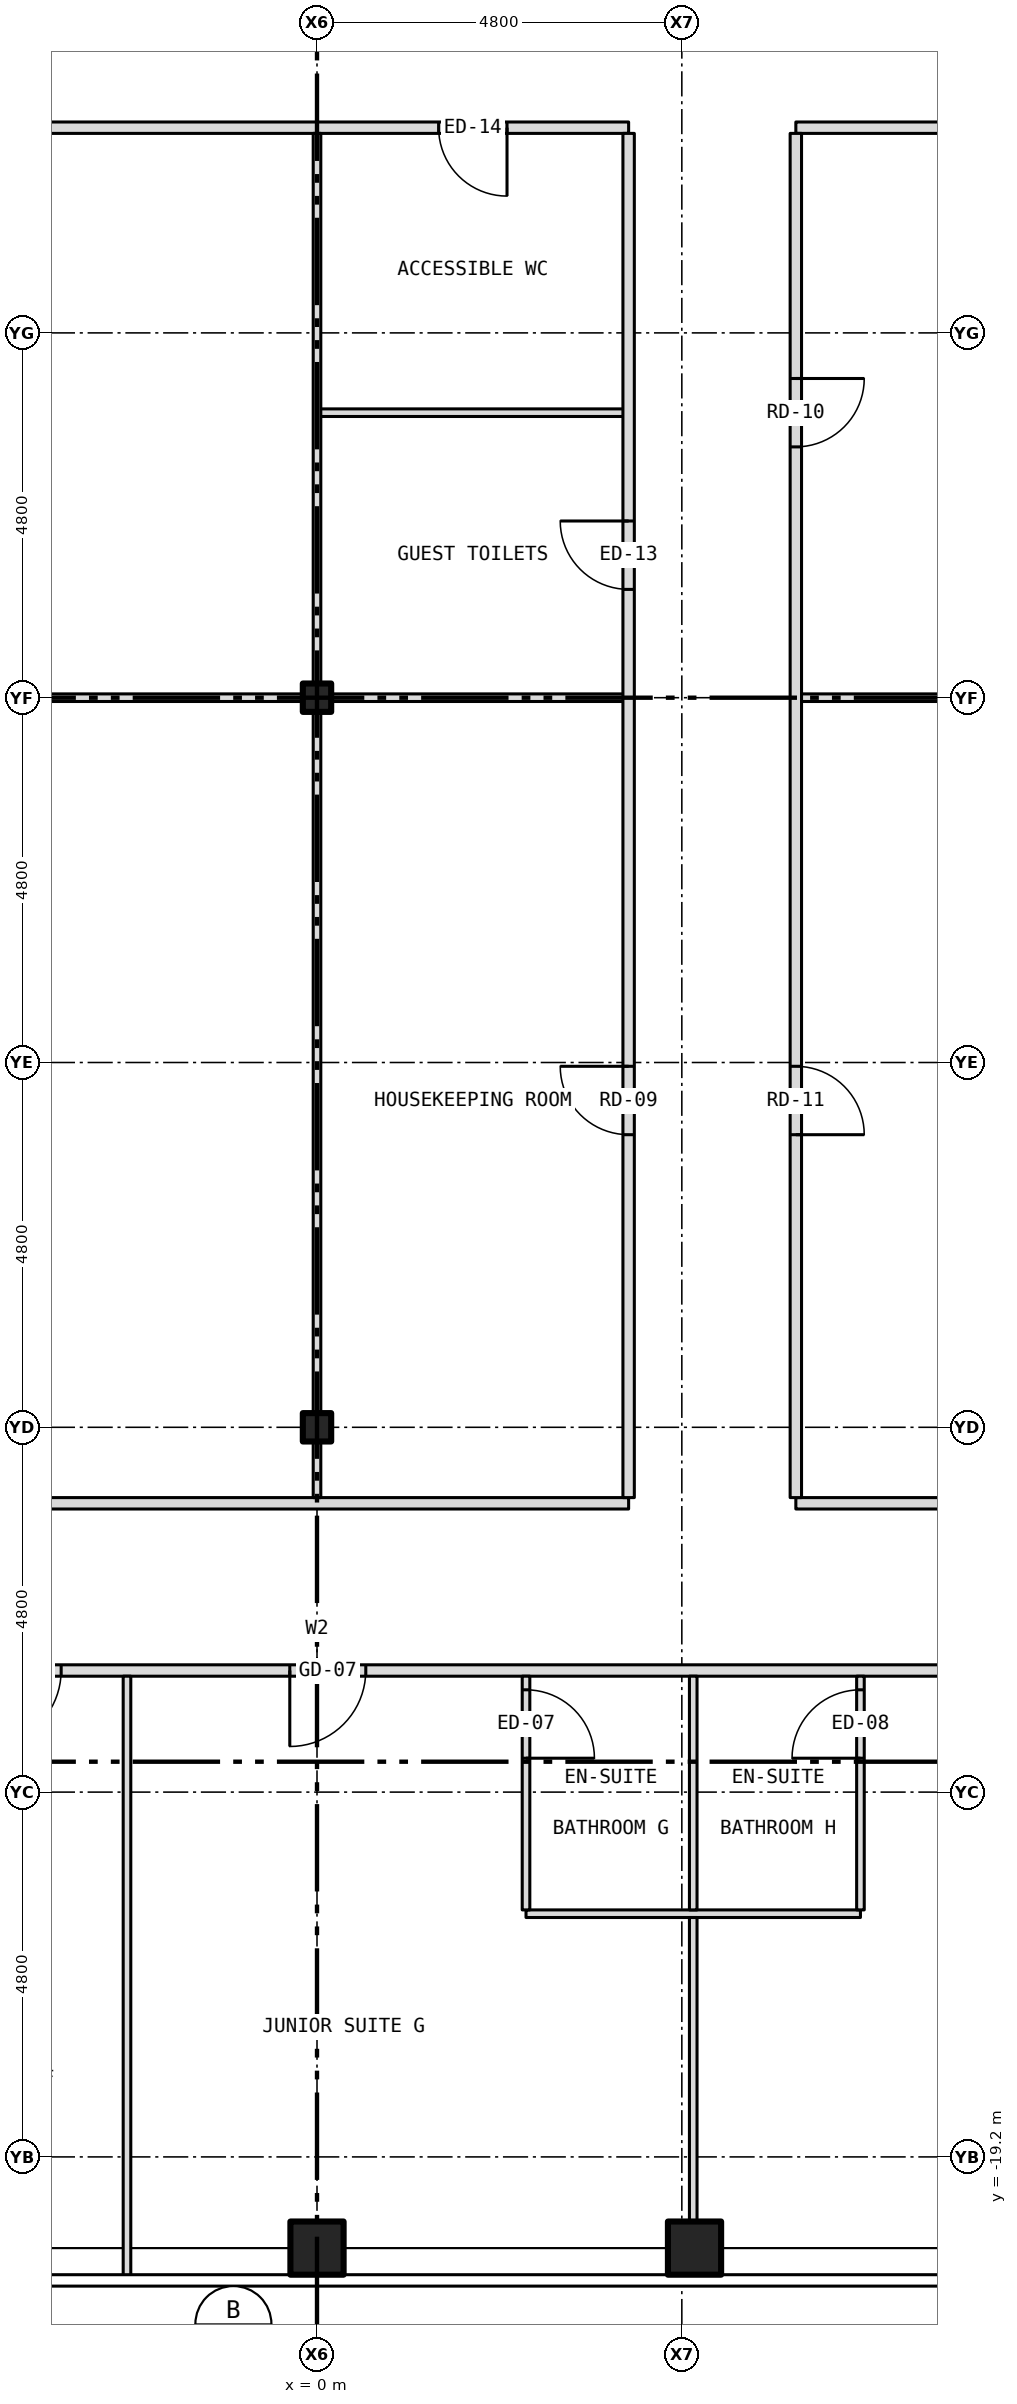
"""IFC4 building model, lengths in metres.
Left out: names, types, materials, properties, quantities, classifications, styles, units other than length and angle.
Written with IfcOpenShell. Run it as: python <this file> out.ifc"""

import sys

from ifc_helpers import new_model, si_unit, direction, frame, frame_2d, origin, origin_2d, place, context, subcontext, project, spatial, rectangle, hollow_rectangle, i_section, extrude, element, fill, save


model = new_model("IFC4")
c1 = context("Model", 3, precision=1e-05, world=origin(), true_north=direction((0.0, 1.0)))
c2 = subcontext(c1, "Body", "Model", "MODEL_VIEW")
j1 = project(units=[si_unit("LENGTHUNIT", "METRE"), si_unit("PLANEANGLEUNIT", "RADIAN")], contexts=[c1])
p1 = place(None, origin())
s1 = spatial("IfcSite", under=j1, at=p1, CompositionType="ELEMENT")
p2 = place(p1, origin())
s2 = spatial("IfcBuilding", under=s1, at=p2, CompositionType="ELEMENT")
p3 = place(p2, frame((0.0, 0.0, 198.0)))
s3 = spatial("IfcBuildingStorey", under=s2, at=p3, CompositionType="ELEMENT", Elevation=198.0)
for number, where, z_axis, x_axis in (
    (1, (0.0, -20.4, -0.15), (0.0, 0.0, 1.0), (1.0, 0.0, 0.0)),
    (2, (4.967, -20.4, -0.15), (0.0, 0.0, 1.0), (1.0, 0.0, 0.0)),
):
    element("IfcColumn", number, at=place(p3, frame(where, z_axis=z_axis, x_axis=x_axis)), inside=s3, PredefinedType="COLUMN", context=c2, shape_type="SweptSolid", body=[
        extrude(hollow_rectangle(XDim=0.7, YDim=0.7, WallThickness=0.04, at=origin_2d()), origin(), (0.0, 0.0, 1.0), 3.5),
    ])
for number, where, z_axis, x_axis in (
    (3, (0.0, -9.6, -0.15), (0.0, 0.0, 1.0), (1.0, 0.0, 0.0)),
    (4, (0.0, 0.0, -0.15), (0.0, 0.0, 1.0), (1.0, 0.0, 0.0)),
):
    element("IfcColumn", number, at=place(p3, frame(where, z_axis=z_axis, x_axis=x_axis)), inside=s3, PredefinedType="COLUMN", context=c2, shape_type="SweptSolid", body=[
        extrude(i_section(OverallWidth=0.373, OverallDepth=0.373, WebThickness=0.016, FlangeThickness=0.026, at=origin_2d()), origin(), (0.0, 0.0, 1.0), 3.5),
    ])
p4 = place(p3, frame((2.75, -16.0, 0.0), z_axis=(0.0, 0.0, 1.0), x_axis=(1.0, 0.0, 0.0)))
e5 = element("IfcWall", 5, at=p4, inside=s3, PredefinedType="PARTITIONING", context=c2, shape_type="SweptSolid", body=[
    extrude(rectangle(XDim=4.4, YDim=0.1, at=frame_2d((2.2, 0.0))), origin(), (0.0, 0.0, 1.0), 3.35),
])
p5 = place(p3, frame((-15.8, -12.8, 0.0), z_axis=(0.0, 0.0, 1.0), x_axis=(1.0, 0.0, 0.0)))
e6 = element("IfcWall", 6, at=p5, inside=s3, PredefinedType="PARTITIONING", context=c2, shape_type="SweptSolid", body=[
    extrude(rectangle(XDim=31.6, YDim=0.15, at=frame_2d((15.8, 0.0))), origin(), (0.0, 0.0, 1.0), 3.35),
])
p6 = place(p5, frame((6.466, 0.0, 0.0)))
e7 = element("IfcOpeningElement", 7, at=p6, cuts=e6, PredefinedType="OPENING", context=c2, shape_type="SweptSolid", body=[
    extrude(rectangle(XDim=1.0, YDim=2.1, at=frame_2d((0.5, 1.05))), frame((0.0, 0.087, 0.0), z_axis=(0.0, -1.0, 0.0), x_axis=(1.0, 0.0, 0.0)), (0.0, 0.0, 1.0), 0.174),
])
p7 = place(p5, frame((11.434, 0.0, 0.0)))
e8 = element("IfcOpeningElement", 8, at=p7, cuts=e6, PredefinedType="OPENING", context=c2, shape_type="SweptSolid", body=[
    extrude(rectangle(XDim=1.0, YDim=2.1, at=frame_2d((0.5, 1.05))), frame((0.0, 0.087, 0.0), z_axis=(0.0, -1.0, 0.0), x_axis=(1.0, 0.0, 0.0)), (0.0, 0.0, 1.0), 0.174),
])
p8 = place(p5, frame((15.442, 0.0, 0.0)))
e9 = element("IfcOpeningElement", 9, at=p8, cuts=e6, PredefinedType="OPENING", context=c2, shape_type="SweptSolid", body=[
    extrude(rectangle(XDim=1.0, YDim=2.1, at=frame_2d((0.5, 1.05))), frame((0.0, 0.087, 0.0), z_axis=(0.0, -1.0, 0.0), x_axis=(1.0, 0.0, 0.0)), (0.0, 0.0, 1.0), 0.174),
])
p9 = place(p5, frame((25.092, 0.0, 0.0)))
e10 = element("IfcOpeningElement", 10, at=p9, cuts=e6, PredefinedType="OPENING", context=c2, shape_type="SweptSolid", body=[
    extrude(rectangle(XDim=1.0, YDim=2.1, at=frame_2d((0.5, 1.05))), frame((0.0, 0.087, 0.0), z_axis=(0.0, -1.0, 0.0), x_axis=(1.0, 0.0, 0.0)), (0.0, 0.0, 1.0), 0.174),
])
p10 = place(p5, frame((1.192, 0.0, 0.0)))
e11 = element("IfcOpeningElement", 11, at=p10, cuts=e6, PredefinedType="OPENING", context=c2, shape_type="SweptSolid", body=[
    extrude(rectangle(XDim=1.0, YDim=2.1, at=frame_2d((0.5, 1.05))), frame((0.0, 0.087, 0.0), z_axis=(0.0, -1.0, 0.0), x_axis=(1.0, 0.0, 0.0)), (0.0, 0.0, 1.0), 0.174),
])
p11 = place(p5, frame((29.409, 0.0, 0.0)))
e12 = element("IfcOpeningElement", 12, at=p11, cuts=e6, PredefinedType="OPENING", context=c2, shape_type="SweptSolid", body=[
    extrude(rectangle(XDim=1.0, YDim=2.1, at=frame_2d((0.5, 1.05))), frame((0.0, 0.087, 0.0), z_axis=(0.0, -1.0, 0.0), x_axis=(1.0, 0.0, 0.0)), (0.0, 0.0, 1.0), 0.174),
])
p12 = place(p3, frame((-12.8, -10.6, 0.0), z_axis=(0.0, 0.0, 1.0), x_axis=(1.0, 0.0, 0.0)))
e13 = element("IfcWall", 13, at=p12, inside=s3, PredefinedType="PARTITIONING", context=c2, shape_type="SweptSolid", body=[
    extrude(rectangle(XDim=16.9, YDim=0.15, at=frame_2d((8.45, 0.0))), origin(), (0.0, 0.0, 1.0), 3.35),
])
p13 = place(p12, frame((5.95, 0.0, 0.0)))
e14 = element("IfcOpeningElement", 14, at=p13, cuts=e13, PredefinedType="OPENING", context=c2, shape_type="SweptSolid", body=[
    extrude(rectangle(XDim=0.9, YDim=2.1, at=frame_2d((0.45, 1.05))), frame((0.0, 0.087, 0.0), z_axis=(0.0, -1.0, 0.0), x_axis=(1.0, 0.0, 0.0)), (0.0, 0.0, 1.0), 0.174),
])
p14 = place(p3, frame((6.3, -10.6, 0.0), z_axis=(0.0, 0.0, 1.0), x_axis=(1.0, 0.0, 0.0)))
e15 = element("IfcWall", 15, at=p14, inside=s3, PredefinedType="PARTITIONING", context=c2, shape_type="SweptSolid", body=[
    extrude(rectangle(XDim=6.5, YDim=0.15, at=frame_2d((3.25, 0.0))), origin(), (0.0, 0.0, 1.0), 3.35),
])
p15 = place(p3, frame((-9.413, 0.0, 0.0), z_axis=(0.0, 0.0, 1.0), x_axis=(1.0, 0.0, 0.0)))
e16 = element("IfcWall", 16, at=p15, inside=s3, PredefinedType="PARTITIONING", context=c2, shape_type="SweptSolid", body=[
    extrude(rectangle(XDim=9.226, YDim=0.1, at=frame_2d((4.613, 0.0))), origin(), (0.0, 0.0, 1.0), 2.728),
])
p16 = place(p3, frame((-0.187, 0.0, 0.0), z_axis=(0.0, 0.0, 1.0), x_axis=(1.0, 0.0, 0.0)))
e17 = element("IfcWall", 17, at=p16, inside=s3, PredefinedType="PARTITIONING", context=c2, shape_type="SweptSolid", body=[
    extrude(rectangle(XDim=0.374, YDim=0.1, at=frame_2d((0.187, 0.0))), origin(), (0.0, 0.0, 1.0), 3.35),
])
p17 = place(p3, frame((0.187, 0.0, 0.0), z_axis=(0.0, 0.0, 1.0), x_axis=(1.0, 0.0, 0.0)))
e18 = element("IfcWall", 18, at=p17, inside=s3, PredefinedType="PARTITIONING", context=c2, shape_type="SweptSolid", body=[
    extrude(rectangle(XDim=3.913, YDim=0.1, at=frame_2d((1.957, 0.0))), origin(), (0.0, 0.0, 1.0), 2.728),
])
p18 = place(p3, frame((6.3, 0.0, 0.0), z_axis=(0.0, 0.0, 1.0), x_axis=(1.0, 0.0, 0.0)))
e19 = element("IfcWall", 19, at=p18, inside=s3, PredefinedType="PARTITIONING", context=c2, shape_type="SweptSolid", body=[
    extrude(rectangle(XDim=3.113, YDim=0.1, at=frame_2d((1.557, 0.0))), origin(), (0.0, 0.0, 1.0), 2.728),
])
p19 = place(p3, frame((0.0, 3.75, 0.0), z_axis=(0.0, 0.0, 1.0), x_axis=(1.0, 0.0, 0.0)))
e20 = element("IfcWall", 20, at=p19, inside=s3, PredefinedType="PARTITIONING", context=c2, shape_type="SweptSolid", body=[
    extrude(rectangle(XDim=4.1, YDim=0.1, at=frame_2d((2.05, 0.0))), origin(), (0.0, 0.0, 1.0), 3.35),
])
p20 = place(p3, frame((-12.8, 7.5, 0.0), z_axis=(0.0, 0.0, 1.0), x_axis=(1.0, 0.0, 0.0)))
e21 = element("IfcWall", 21, at=p20, inside=s3, PredefinedType="PARTITIONING", context=c2, shape_type="SweptSolid", body=[
    extrude(rectangle(XDim=16.9, YDim=0.15, at=frame_2d((8.45, 0.0))), origin(), (0.0, 0.0, 1.0), 3.35),
])
p21 = place(p20, frame((14.4, 0.0, 0.0)))
e22 = element("IfcOpeningElement", 22, at=p21, cuts=e21, PredefinedType="OPENING", context=c2, shape_type="SweptSolid", body=[
    extrude(rectangle(XDim=0.9, YDim=2.1, at=frame_2d((0.45, 1.05))), frame((0.0, 0.087, 0.0), z_axis=(0.0, -1.0, 0.0), x_axis=(1.0, 0.0, 0.0)), (0.0, 0.0, 1.0), 0.174),
])
p22 = place(p20, frame((5.95, 0.0, 0.0)))
e23 = element("IfcOpeningElement", 23, at=p22, cuts=e21, PredefinedType="OPENING", context=c2, shape_type="SweptSolid", body=[
    extrude(rectangle(XDim=0.9, YDim=2.1, at=frame_2d((0.45, 1.05))), frame((0.0, 0.087, 0.0), z_axis=(0.0, -1.0, 0.0), x_axis=(1.0, 0.0, 0.0)), (0.0, 0.0, 1.0), 0.174),
])
p23 = place(p3, frame((6.3, 7.5, 0.0), z_axis=(0.0, 0.0, 1.0), x_axis=(1.0, 0.0, 0.0)))
e24 = element("IfcWall", 24, at=p23, inside=s3, PredefinedType="PARTITIONING", context=c2, shape_type="SweptSolid", body=[
    extrude(rectangle(XDim=6.5, YDim=0.15, at=frame_2d((3.25, 0.0))), origin(), (0.0, 0.0, 1.0), 3.35),
])
p24 = place(p3, frame((-2.5, -20.78, 0.0), z_axis=(0.0, 0.0, 1.0), x_axis=(0.0, 1.0, 0.0)))
e25 = element("IfcWall", 25, at=p24, inside=s3, PredefinedType="PARTITIONING", context=c2, shape_type="SweptSolid", body=[
    extrude(rectangle(XDim=7.905, YDim=0.1, at=frame_2d((3.953, 0.0))), origin(), (0.0, 0.0, 1.0), 3.35),
])
p25 = place(p3, frame((0.0, -10.525, 0.0), z_axis=(0.0, 0.0, 1.0), x_axis=(0.0, 1.0, 0.0)))
e26 = element("IfcWall", 26, at=p25, inside=s3, PredefinedType="PARTITIONING", context=c2, shape_type="SweptSolid", body=[
    extrude(rectangle(XDim=0.738, YDim=0.1, at=frame_2d((0.369, 0.0))), origin(), (0.0, 0.0, 1.0), 2.728),
])
p26 = place(p3, frame((0.0, -9.787, 0.0), z_axis=(0.0, 0.0, 1.0), x_axis=(0.0, 1.0, 0.0)))
e27 = element("IfcWall", 27, at=p26, inside=s3, PredefinedType="PARTITIONING", context=c2, shape_type="SweptSolid", body=[
    extrude(rectangle(XDim=0.374, YDim=0.1, at=frame_2d((0.187, 0.0))), origin(), (0.0, 0.0, 1.0), 3.35),
])
p27 = place(p3, frame((0.0, -9.413, 0.0), z_axis=(0.0, 0.0, 1.0), x_axis=(0.0, 1.0, 0.0)))
e28 = element("IfcWall", 28, at=p27, inside=s3, PredefinedType="PARTITIONING", context=c2, shape_type="SweptSolid", body=[
    extrude(rectangle(XDim=9.363, YDim=0.1, at=frame_2d((4.682, 0.0))), origin(), (0.0, 0.0, 1.0), 2.728),
])
p28 = place(p3, frame((0.0, 0.05, 0.0), z_axis=(0.0, 0.0, 1.0), x_axis=(0.0, 1.0, 0.0)))
e29 = element("IfcWall", 29, at=p28, inside=s3, PredefinedType="PARTITIONING", context=c2, shape_type="SweptSolid", body=[
    extrude(rectangle(XDim=7.375, YDim=0.1, at=frame_2d((3.688, 0.0))), origin(), (0.0, 0.0, 1.0), 2.728),
])
p29 = place(p3, frame((2.75, -15.95, 0.0), z_axis=(0.0, 0.0, 1.0), x_axis=(0.0, 1.0, 0.0)))
e30 = element("IfcWall", 30, at=p29, inside=s3, PredefinedType="PARTITIONING", context=c2, shape_type="SweptSolid", body=[
    extrude(rectangle(XDim=3.075, YDim=0.1, at=frame_2d((1.538, 0.0))), origin(), (0.0, 0.0, 1.0), 3.35),
])
p30 = place(p29, frame((1.996, 0.0, 0.0)))
e31 = element("IfcOpeningElement", 31, at=p30, cuts=e30, PredefinedType="OPENING", context=c2, shape_type="SweptSolid", body=[
    extrude(rectangle(XDim=0.9, YDim=2.1, at=frame_2d((0.45, 1.05))), frame((0.0, 0.062, 0.0), z_axis=(0.0, -1.0, 0.0), x_axis=(1.0, 0.0, 0.0)), (0.0, 0.0, 1.0), 0.124),
])
p31 = place(p3, frame((4.1, -10.525, 0.0), z_axis=(0.0, 0.0, 1.0), x_axis=(0.0, 1.0, 0.0)))
e32 = element("IfcWall", 32, at=p31, inside=s3, PredefinedType="PARTITIONING", context=c2, shape_type="SweptSolid", body=[
    extrude(rectangle(XDim=17.95, YDim=0.15, at=frame_2d((8.975, 0.0))), origin(), (0.0, 0.0, 1.0), 3.35),
])
p32 = place(p31, frame((11.95, 0.0, 0.0)))
e33 = element("IfcOpeningElement", 33, at=p32, cuts=e32, PredefinedType="OPENING", context=c2, shape_type="SweptSolid", body=[
    extrude(rectangle(XDim=0.9, YDim=2.1, at=frame_2d((0.45, 1.05))), frame((0.0, 0.087, 0.0), z_axis=(0.0, -1.0, 0.0), x_axis=(1.0, 0.0, 0.0)), (0.0, 0.0, 1.0), 0.174),
])
p33 = place(p31, frame((4.775, 0.0, 0.0)))
e34 = element("IfcOpeningElement", 34, at=p33, cuts=e32, PredefinedType="OPENING", context=c2, shape_type="SweptSolid", body=[
    extrude(rectangle(XDim=0.9, YDim=2.1, at=frame_2d((0.45, 1.05))), frame((0.0, 0.087, 0.0), z_axis=(0.0, -1.0, 0.0), x_axis=(1.0, 0.0, 0.0)), (0.0, 0.0, 1.0), 0.174),
])
p34 = place(p3, frame((4.95, -20.28, 0.0), z_axis=(0.0, 0.0, 1.0), x_axis=(0.0, 1.0, 0.0)))
e35 = element("IfcWall", 35, at=p34, inside=s3, PredefinedType="PARTITIONING", context=c2, shape_type="SweptSolid", body=[
    extrude(rectangle(XDim=4.23, YDim=0.1, at=frame_2d((2.115, 0.0))), origin(), (0.0, 0.0, 1.0), 2.817),
])
p35 = place(p3, frame((4.95, -15.95, 0.0), z_axis=(0.0, 0.0, 1.0), x_axis=(0.0, 1.0, 0.0)))
e36 = element("IfcWall", 36, at=p35, inside=s3, PredefinedType="PARTITIONING", context=c2, shape_type="SweptSolid", body=[
    extrude(rectangle(XDim=3.075, YDim=0.1, at=frame_2d((1.538, 0.0))), origin(), (0.0, 0.0, 1.0), 2.817),
])
p36 = place(p3, frame((6.3, -10.525, 0.0), z_axis=(0.0, 0.0, 1.0), x_axis=(0.0, 1.0, 0.0)))
e37 = element("IfcWall", 37, at=p36, inside=s3, PredefinedType="PARTITIONING", context=c2, shape_type="SweptSolid", body=[
    extrude(rectangle(XDim=17.95, YDim=0.15, at=frame_2d((8.975, 0.0))), origin(), (0.0, 0.0, 1.0), 3.35),
])
p37 = place(p36, frame((13.825, 0.0, 0.0)))
e38 = element("IfcOpeningElement", 38, at=p37, cuts=e37, PredefinedType="OPENING", context=c2, shape_type="SweptSolid", body=[
    extrude(rectangle(XDim=0.9, YDim=2.1, at=frame_2d((0.45, 1.05))), frame((0.0, 0.087, 0.0), z_axis=(0.0, -1.0, 0.0), x_axis=(1.0, 0.0, 0.0)), (0.0, 0.0, 1.0), 0.174),
])
p38 = place(p36, frame((4.775, 0.0, 0.0)))
e39 = element("IfcOpeningElement", 39, at=p38, cuts=e37, PredefinedType="OPENING", context=c2, shape_type="SweptSolid", body=[
    extrude(rectangle(XDim=0.9, YDim=2.1, at=frame_2d((0.45, 1.05))), frame((0.0, 0.087, 0.0), z_axis=(0.0, -1.0, 0.0), x_axis=(1.0, 0.0, 0.0)), (0.0, 0.0, 1.0), 0.174),
])
p39 = place(p3, frame((7.15, -15.95, 0.0), z_axis=(0.0, 0.0, 1.0), x_axis=(0.0, 1.0, 0.0)))
e40 = element("IfcWall", 40, at=p39, inside=s3, PredefinedType="PARTITIONING", context=c2, shape_type="SweptSolid", body=[
    extrude(rectangle(XDim=3.075, YDim=0.1, at=frame_2d((1.538, 0.0))), origin(), (0.0, 0.0, 1.0), 3.35),
])
p40 = place(p39, frame((1.996, 0.0, 0.0)))
e41 = element("IfcOpeningElement", 41, at=p40, cuts=e40, PredefinedType="OPENING", context=c2, shape_type="SweptSolid", body=[
    extrude(rectangle(XDim=0.9, YDim=2.1, at=frame_2d((0.45, 1.05))), frame((0.0, 0.062, 0.0), z_axis=(0.0, -1.0, 0.0), x_axis=(1.0, 0.0, 0.0)), (0.0, 0.0, 1.0), 0.124),
])
p41 = place(p7, origin())
e42 = element("IfcDoor", 42, at=p41, inside=s3, OperationType="SINGLE_SWING_LEFT", PredefinedType="DOOR", context=c2, shape_type="SweptSolid", body=[
    extrude(rectangle(XDim=1.0, YDim=2.1, at=frame_2d((0.5, 1.05))), frame((0.0, 0.025, 0.0), z_axis=(0.0, -1.0, 0.0), x_axis=(1.0, 0.0, 0.0)), (0.0, 0.0, 1.0), 0.05),
])
fill(e8, e42)
p42 = place(p8, origin())
e43 = element("IfcDoor", 43, at=p42, inside=s3, OperationType="SINGLE_SWING_LEFT", PredefinedType="DOOR", context=c2, shape_type="SweptSolid", body=[
    extrude(rectangle(XDim=1.0, YDim=2.1, at=frame_2d((0.5, 1.05))), frame((0.0, 0.025, 0.0), z_axis=(0.0, -1.0, 0.0), x_axis=(1.0, 0.0, 0.0)), (0.0, 0.0, 1.0), 0.05),
])
fill(e9, e43)
p43 = place(p30, origin())
e44 = element("IfcDoor", 44, at=p43, inside=s3, OperationType="SINGLE_SWING_LEFT", PredefinedType="DOOR", context=c2, shape_type="SweptSolid", body=[
    extrude(rectangle(XDim=0.9, YDim=2.1, at=frame_2d((0.45, 1.05))), frame((0.0, 0.025, 0.0), z_axis=(0.0, -1.0, 0.0), x_axis=(1.0, 0.0, 0.0)), (0.0, 0.0, 1.0), 0.05),
])
fill(e31, e44)
p44 = place(p40, origin())
e45 = element("IfcDoor", 45, at=p44, inside=s3, OperationType="SINGLE_SWING_LEFT", PredefinedType="DOOR", context=c2, shape_type="SweptSolid", body=[
    extrude(rectangle(XDim=0.9, YDim=2.1, at=frame_2d((0.45, 1.05))), frame((0.0, 0.025, 0.0), z_axis=(0.0, -1.0, 0.0), x_axis=(1.0, 0.0, 0.0)), (0.0, 0.0, 1.0), 0.05),
])
fill(e41, e45)
p45 = place(p32, origin())
e46 = element("IfcDoor", 46, at=p45, inside=s3, OperationType="SINGLE_SWING_RIGHT", PredefinedType="DOOR", context=c2, shape_type="SweptSolid", body=[
    extrude(rectangle(XDim=0.9, YDim=2.1, at=frame_2d((0.45, 1.05))), frame((0.0, 0.025, 0.0), z_axis=(0.0, -1.0, 0.0), x_axis=(1.0, 0.0, 0.0)), (0.0, 0.0, 1.0), 0.05),
])
fill(e33, e46)
p46 = place(p21, origin())
e47 = element("IfcDoor", 47, at=p46, inside=s3, OperationType="SINGLE_SWING_RIGHT", PredefinedType="DOOR", context=c2, shape_type="SweptSolid", body=[
    extrude(rectangle(XDim=0.9, YDim=2.1, at=frame_2d((0.45, 1.05))), frame((0.0, 0.025, 0.0), z_axis=(0.0, -1.0, 0.0), x_axis=(1.0, 0.0, 0.0)), (0.0, 0.0, 1.0), 0.05),
])
fill(e22, e47)
p47 = place(p33, origin())
e48 = element("IfcDoor", 48, at=p47, inside=s3, OperationType="SINGLE_SWING_RIGHT", PredefinedType="DOOR", context=c2, shape_type="SweptSolid", body=[
    extrude(rectangle(XDim=0.9, YDim=2.1, at=frame_2d((0.45, 1.05))), frame((0.0, 0.025, 0.0), z_axis=(0.0, -1.0, 0.0), x_axis=(1.0, 0.0, 0.0)), (0.0, 0.0, 1.0), 0.05),
])
fill(e34, e48)
p48 = place(p37, origin())
e49 = element("IfcDoor", 49, at=p48, inside=s3, OperationType="SINGLE_SWING_RIGHT", PredefinedType="DOOR", context=c2, shape_type="SweptSolid", body=[
    extrude(rectangle(XDim=0.9, YDim=2.1, at=frame_2d((0.45, 1.05))), frame((0.0, 0.025, 0.0), z_axis=(0.0, -1.0, 0.0), x_axis=(1.0, 0.0, 0.0)), (0.0, 0.0, 1.0), 0.05),
])
fill(e38, e49)
p49 = place(p38, origin())
e50 = element("IfcDoor", 50, at=p49, inside=s3, OperationType="SINGLE_SWING_LEFT", PredefinedType="DOOR", context=c2, shape_type="SweptSolid", body=[
    extrude(rectangle(XDim=0.9, YDim=2.1, at=frame_2d((0.45, 1.05))), frame((0.0, 0.025, 0.0), z_axis=(0.0, -1.0, 0.0), x_axis=(1.0, 0.0, 0.0)), (0.0, 0.0, 1.0), 0.05),
])
fill(e39, e50)
save(model, sys.argv[1])
